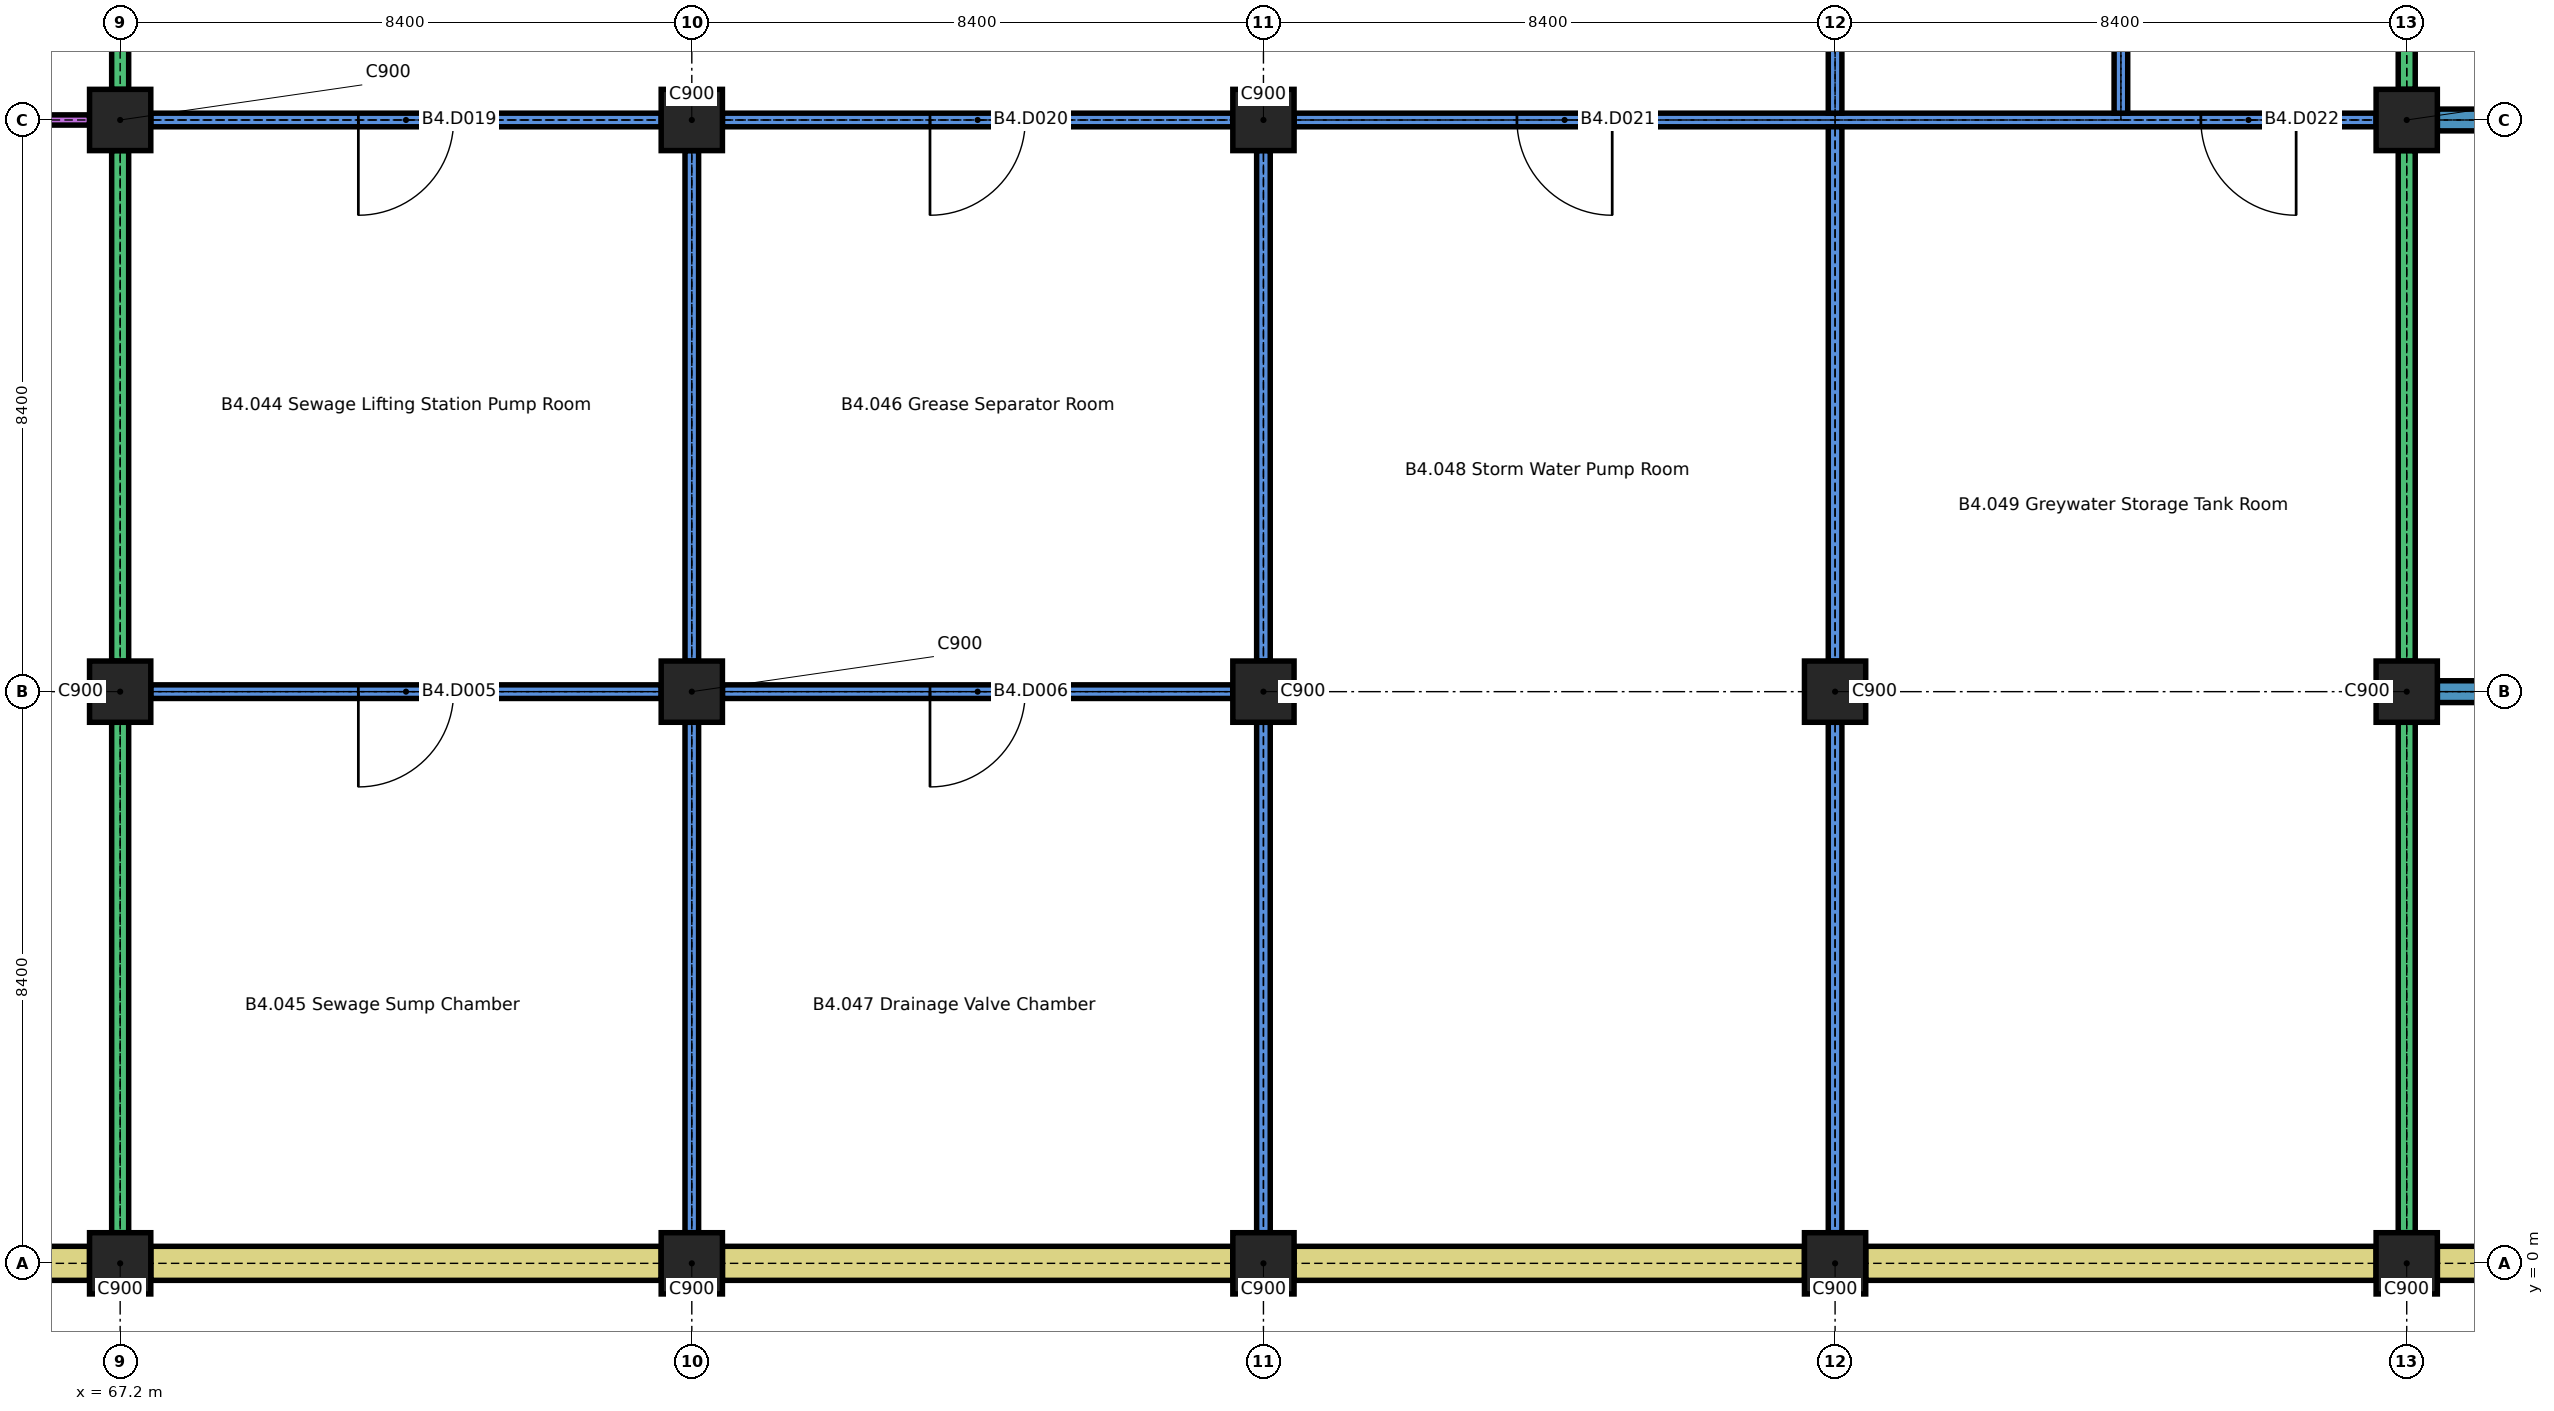
"""IFC4 building model, lengths in metres.
Left out: names, types, materials, properties, quantities, classifications, styles, units other than length and angle.
Written with IfcOpenShell. Run it as: python <this file> out.ifc"""

import sys

from ifc_helpers import new_model, si_unit, direction, frame, frame_2d, origin, origin_2d, place, context, subcontext, project, spatial, rectangle, extrude, element, fill, save


model = new_model("IFC4")
c1 = context("Model", 3, precision=1e-05, world=origin(), true_north=direction((0.0, 1.0)))
c2 = subcontext(c1, "Body", "Model", "MODEL_VIEW")
j1 = project(units=[si_unit("LENGTHUNIT", "METRE"), si_unit("PLANEANGLEUNIT", "RADIAN")], contexts=[c1])
p1 = place(None, origin())
s1 = spatial("IfcSite", under=j1, at=p1, CompositionType="ELEMENT")
p2 = place(p1, origin())
s2 = spatial("IfcBuilding", under=s1, at=p2, CompositionType="ELEMENT")
p3 = place(p2, frame((0.0, 0.0, -15.0)))
s3 = spatial("IfcBuildingStorey", under=s2, at=p3, CompositionType="ELEMENT", Elevation=-15.0)
for number, where, z_axis, x_axis in (
    (1, (67.2, 0.0, 0.0), (0.0, 0.0, 1.0), (1.0, 0.0, 0.0)),
    (2, (75.6, 0.0, 0.0), (0.0, 0.0, 1.0), (1.0, 0.0, 0.0)),
    (3, (84.0, 0.0, 0.0), (0.0, 0.0, 1.0), (1.0, 0.0, 0.0)),
    (4, (92.4, 0.0, 0.0), (0.0, 0.0, 1.0), (1.0, 0.0, 0.0)),
    (5, (100.8, 0.0, 0.0), (0.0, 0.0, 1.0), (1.0, 0.0, 0.0)),
    (6, (67.2, 8.4, 0.0), (0.0, 0.0, 1.0), (1.0, 0.0, 0.0)),
    (7, (75.6, 8.4, 0.0), (0.0, 0.0, 1.0), (1.0, 0.0, 0.0)),
    (8, (84.0, 8.4, 0.0), (0.0, 0.0, 1.0), (1.0, 0.0, 0.0)),
    (9, (92.4, 8.4, 0.0), (0.0, 0.0, 1.0), (1.0, 0.0, 0.0)),
    (10, (100.8, 8.4, 0.0), (0.0, 0.0, 1.0), (1.0, 0.0, 0.0)),
    (11, (67.2, 16.8, 0.0), (0.0, 0.0, 1.0), (1.0, 0.0, 0.0)),
    (12, (75.6, 16.8, 0.0), (0.0, 0.0, 1.0), (1.0, 0.0, 0.0)),
    (13, (84.0, 16.8, 0.0), (0.0, 0.0, 1.0), (1.0, 0.0, 0.0)),
    (14, (100.8, 16.8, 0.0), (0.0, 0.0, 1.0), (1.0, 0.0, 0.0)),
):
    element("IfcColumn", number, at=place(p3, frame(where, z_axis=z_axis, x_axis=x_axis)), inside=s3, PredefinedType="COLUMN", context=c2, shape_type="SweptSolid", body=[
        extrude(rectangle(XDim=0.9, YDim=0.9, at=origin_2d()), origin(), (0.0, 0.0, 1.0), 3.2),
    ])
for number, where, z_axis, x_axis in (
    (15, (59.25, 0.0, 0.0), (0.0, 0.0, 1.0), (1.0, 0.0, 0.0)),
    (16, (67.65, 0.0, 0.0), (0.0, 0.0, 1.0), (1.0, 0.0, 0.0)),
    (17, (76.05, 0.0, 0.0), (0.0, 0.0, 1.0), (1.0, 0.0, 0.0)),
    (18, (84.45, 0.0, 0.0), (0.0, 0.0, 1.0), (1.0, 0.0, 0.0)),
    (19, (92.85, 0.0, 0.0), (0.0, 0.0, 1.0), (1.0, 0.0, 0.0)),
    (20, (101.25, 0.0, 0.0), (0.0, 0.0, 1.0), (1.0, 0.0, 0.0)),
):
    element("IfcWall", number, at=place(p3, frame(where, z_axis=z_axis, x_axis=x_axis)), inside=s3, PredefinedType="SOLIDWALL", context=c2, shape_type="SweptSolid", body=[
        extrude(rectangle(XDim=7.5, YDim=0.5, at=frame_2d((3.75, 0.0))), origin(), (0.0, 0.0, 1.0), 3.2),
    ])
p4 = place(p3, frame((67.65, 8.4, 0.0), z_axis=(0.0, 0.0, 1.0), x_axis=(1.0, 0.0, 0.0)))
e21 = element("IfcWall", 21, at=p4, inside=s3, PredefinedType="PARTITIONING", context=c2, shape_type="SweptSolid", body=[
    extrude(rectangle(XDim=7.5, YDim=0.2, at=frame_2d((3.75, 0.0))), origin(), (0.0, 0.0, 1.0), 3.2),
])
p5 = place(p4, frame((3.05, 0.0, 0.0)))
e22 = element("IfcOpeningElement", 22, at=p5, cuts=e21, PredefinedType="OPENING", context=c2, shape_type="SweptSolid", body=[
    extrude(rectangle(XDim=1.4, YDim=2.1, at=frame_2d((0.7, 1.05))), frame((0.0, 0.11, 0.0), z_axis=(0.0, -1.0, 0.0), x_axis=(1.0, 0.0, 0.0)), (0.0, 0.0, 1.0), 0.22),
])
p6 = place(p3, frame((76.05, 8.4, 0.0), z_axis=(0.0, 0.0, 1.0), x_axis=(1.0, 0.0, 0.0)))
e23 = element("IfcWall", 23, at=p6, inside=s3, PredefinedType="PARTITIONING", context=c2, shape_type="SweptSolid", body=[
    extrude(rectangle(XDim=7.5, YDim=0.2, at=frame_2d((3.75, 0.0))), origin(), (0.0, 0.0, 1.0), 3.2),
])
p7 = place(p6, frame((3.05, 0.0, 0.0)))
e24 = element("IfcOpeningElement", 24, at=p7, cuts=e23, PredefinedType="OPENING", context=c2, shape_type="SweptSolid", body=[
    extrude(rectangle(XDim=1.4, YDim=2.1, at=frame_2d((0.7, 1.05))), frame((0.0, 0.11, 0.0), z_axis=(0.0, -1.0, 0.0), x_axis=(1.0, 0.0, 0.0)), (0.0, 0.0, 1.0), 0.22),
])
p8 = place(p3, frame((101.25, 8.4, 0.0), z_axis=(0.0, 0.0, 1.0), x_axis=(1.0, 0.0, 0.0)))
e25 = element("IfcWall", 25, at=p8, inside=s3, PredefinedType="SOLIDWALL", context=c2, shape_type="SweptSolid", body=[
    extrude(rectangle(XDim=7.5, YDim=0.32, at=frame_2d((3.75, 0.0))), origin(), (0.0, 0.0, 1.0), 3.2),
])
p9 = place(p8, frame((3.05, 0.0, 0.0)))
e26 = element("IfcOpeningElement", 26, at=p9, cuts=e25, PredefinedType="OPENING", context=c2, shape_type="SweptSolid", body=[
    extrude(rectangle(XDim=1.4, YDim=2.1, at=frame_2d((0.7, 1.05))), frame((0.0, 0.17, 0.0), z_axis=(0.0, -1.0, 0.0), x_axis=(1.0, 0.0, 0.0)), (0.0, 0.0, 1.0), 0.34),
])
p10 = place(p3, frame((59.25, 16.8, 0.0), z_axis=(0.0, 0.0, 1.0), x_axis=(1.0, 0.0, 0.0)))
e27 = element("IfcWall", 27, at=p10, inside=s3, PredefinedType="PARTITIONING", context=c2, shape_type="SweptSolid", body=[
    extrude(rectangle(XDim=7.5, YDim=0.15, at=frame_2d((3.75, 0.0))), origin(), (0.0, 0.0, 1.0), 3.2),
])
p11 = place(p10, frame((3.05, 0.0, 0.0)))
e28 = element("IfcOpeningElement", 28, at=p11, cuts=e27, PredefinedType="OPENING", context=c2, shape_type="SweptSolid", body=[
    extrude(rectangle(XDim=1.4, YDim=2.1, at=frame_2d((0.7, 1.05))), frame((0.0, 0.085, 0.0), z_axis=(0.0, -1.0, 0.0), x_axis=(1.0, 0.0, 0.0)), (0.0, 0.0, 1.0), 0.17),
])
p12 = place(p3, frame((67.65, 16.8, 0.0), z_axis=(0.0, 0.0, 1.0), x_axis=(1.0, 0.0, 0.0)))
e29 = element("IfcWall", 29, at=p12, inside=s3, PredefinedType="PARTITIONING", context=c2, shape_type="SweptSolid", body=[
    extrude(rectangle(XDim=7.5, YDim=0.2, at=frame_2d((3.75, 0.0))), origin(), (0.0, 0.0, 1.0), 3.2),
])
p13 = place(p12, frame((3.05, 0.0, 0.0)))
e30 = element("IfcOpeningElement", 30, at=p13, cuts=e29, PredefinedType="OPENING", context=c2, shape_type="SweptSolid", body=[
    extrude(rectangle(XDim=1.4, YDim=2.1, at=frame_2d((0.7, 1.05))), frame((0.0, 0.11, 0.0), z_axis=(0.0, -1.0, 0.0), x_axis=(1.0, 0.0, 0.0)), (0.0, 0.0, 1.0), 0.22),
])
p14 = place(p3, frame((76.05, 16.8, 0.0), z_axis=(0.0, 0.0, 1.0), x_axis=(1.0, 0.0, 0.0)))
e31 = element("IfcWall", 31, at=p14, inside=s3, PredefinedType="PARTITIONING", context=c2, shape_type="SweptSolid", body=[
    extrude(rectangle(XDim=7.5, YDim=0.2, at=frame_2d((3.75, 0.0))), origin(), (0.0, 0.0, 1.0), 3.2),
])
p15 = place(p14, frame((3.05, 0.0, 0.0)))
e32 = element("IfcOpeningElement", 32, at=p15, cuts=e31, PredefinedType="OPENING", context=c2, shape_type="SweptSolid", body=[
    extrude(rectangle(XDim=1.4, YDim=2.1, at=frame_2d((0.7, 1.05))), frame((0.0, 0.11, 0.0), z_axis=(0.0, -1.0, 0.0), x_axis=(1.0, 0.0, 0.0)), (0.0, 0.0, 1.0), 0.22),
])
p16 = place(p3, frame((84.45, 16.8, 0.0), z_axis=(0.0, 0.0, 1.0), x_axis=(1.0, 0.0, 0.0)))
e33 = element("IfcWall", 33, at=p16, inside=s3, PredefinedType="PARTITIONING", context=c2, shape_type="SweptSolid", body=[
    extrude(rectangle(XDim=15.9, YDim=0.2, at=frame_2d((7.95, 0.0))), origin(), (0.0, 0.0, 1.0), 3.2),
])
p17 = place(p16, frame((3.275, 0.0, 0.0)))
e34 = element("IfcOpeningElement", 34, at=p17, cuts=e33, PredefinedType="OPENING", context=c2, shape_type="SweptSolid", body=[
    extrude(rectangle(XDim=1.4, YDim=2.1, at=frame_2d((0.7, 1.05))), frame((0.0, 0.11, 0.0), z_axis=(0.0, -1.0, 0.0), x_axis=(1.0, 0.0, 0.0)), (0.0, 0.0, 1.0), 0.22),
])
p18 = place(p16, frame((13.325, 0.0, 0.0)))
e35 = element("IfcOpeningElement", 35, at=p18, cuts=e33, PredefinedType="OPENING", context=c2, shape_type="SweptSolid", body=[
    extrude(rectangle(XDim=1.4, YDim=2.1, at=frame_2d((0.7, 1.05))), frame((0.0, 0.11, 0.0), z_axis=(0.0, -1.0, 0.0), x_axis=(1.0, 0.0, 0.0)), (0.0, 0.0, 1.0), 0.22),
])
p19 = place(p3, frame((101.25, 16.8, 0.0), z_axis=(0.0, 0.0, 1.0), x_axis=(1.0, 0.0, 0.0)))
e36 = element("IfcWall", 36, at=p19, inside=s3, PredefinedType="SOLIDWALL", context=c2, shape_type="SweptSolid", body=[
    extrude(rectangle(XDim=7.5, YDim=0.32, at=frame_2d((3.75, 0.0))), origin(), (0.0, 0.0, 1.0), 3.2),
])
p20 = place(p19, frame((3.05, 0.0, 0.0)))
e37 = element("IfcOpeningElement", 37, at=p20, cuts=e36, PredefinedType="OPENING", context=c2, shape_type="SweptSolid", body=[
    extrude(rectangle(XDim=1.4, YDim=2.1, at=frame_2d((0.7, 1.05))), frame((0.0, 0.17, 0.0), z_axis=(0.0, -1.0, 0.0), x_axis=(1.0, 0.0, 0.0)), (0.0, 0.0, 1.0), 0.34),
])
for number, where, z_axis, x_axis in (
    (38, (67.2, 0.45, 0.0), (0.0, 0.0, 1.0), (0.0, 1.0, 0.0)),
    (39, (67.2, 8.85, 0.0), (0.0, 0.0, 1.0), (0.0, 1.0, 0.0)),
):
    element("IfcWall", number, at=place(p3, frame(where, z_axis=z_axis, x_axis=x_axis)), inside=s3, PredefinedType="SOLIDWALL", context=c2, shape_type="SweptSolid", body=[
        extrude(rectangle(XDim=7.5, YDim=0.25, at=frame_2d((3.75, 0.0))), origin(), (0.0, 0.0, 1.0), 3.2),
    ])
p21 = place(p3, frame((67.2, 17.25, 0.0), z_axis=(0.0, 0.0, 1.0), x_axis=(0.0, 1.0, 0.0)))
e40 = element("IfcWall", 40, at=p21, inside=s3, PredefinedType="SOLIDWALL", context=c2, shape_type="SweptSolid", body=[
    extrude(rectangle(XDim=12.75, YDim=0.25, at=frame_2d((6.375, 0.0))), origin(), (0.0, 0.0, 1.0), 3.2),
])
p22 = place(p21, frame((1.475, 0.0, 0.0)))
e41 = element("IfcOpeningElement", 41, at=p22, cuts=e40, PredefinedType="OPENING", context=c2, shape_type="SweptSolid", body=[
    extrude(rectangle(XDim=1.4, YDim=2.1, at=frame_2d((0.7, 1.05))), frame((0.0, 0.135, 0.0), z_axis=(0.0, -1.0, 0.0), x_axis=(1.0, 0.0, 0.0)), (0.0, 0.0, 1.0), 0.27),
])
for number, where, z_axis, x_axis in (
    (42, (75.6, 0.45, 0.0), (0.0, 0.0, 1.0), (0.0, 1.0, 0.0)),
    (43, (75.6, 8.85, 0.0), (0.0, 0.0, 1.0), (0.0, 1.0, 0.0)),
    (44, (84.0, 0.45, 0.0), (0.0, 0.0, 1.0), (0.0, 1.0, 0.0)),
    (45, (84.0, 8.85, 0.0), (0.0, 0.0, 1.0), (0.0, 1.0, 0.0)),
    (46, (92.4, 0.45, 0.0), (0.0, 0.0, 1.0), (0.0, 1.0, 0.0)),
):
    element("IfcWall", number, at=place(p3, frame(where, z_axis=z_axis, x_axis=x_axis)), inside=s3, PredefinedType="PARTITIONING", context=c2, shape_type="SweptSolid", body=[
        extrude(rectangle(XDim=7.5, YDim=0.2, at=frame_2d((3.75, 0.0))), origin(), (0.0, 0.0, 1.0), 3.2),
    ])
p23 = place(p3, frame((92.4, 8.85, 0.0), z_axis=(0.0, 0.0, 1.0), x_axis=(0.0, 1.0, 0.0)))
e47 = element("IfcWall", 47, at=p23, inside=s3, PredefinedType="PARTITIONING", context=c2, shape_type="SweptSolid", body=[
    extrude(rectangle(XDim=7.85, YDim=0.2, at=frame_2d((3.925, 0.0))), origin(), (0.0, 0.0, 1.0), 3.2),
])
p24 = place(p3, frame((92.4, 16.9, 0.0), z_axis=(0.0, 0.0, 1.0), x_axis=(0.0, 1.0, 0.0)))
e48 = element("IfcWall", 48, at=p24, inside=s3, PredefinedType="PARTITIONING", context=c2, shape_type="SweptSolid", body=[
    extrude(rectangle(XDim=4.5, YDim=0.2, at=frame_2d((2.25, 0.0))), origin(), (0.0, 0.0, 1.0), 3.2),
])
p25 = place(p24, frame((1.25, 0.0, 0.0)))
e49 = element("IfcOpeningElement", 49, at=p25, cuts=e48, PredefinedType="OPENING", context=c2, shape_type="SweptSolid", body=[
    extrude(rectangle(XDim=2.0, YDim=2.4, at=frame_2d((1.0, 1.2))), frame((0.0, 0.11, 0.0), z_axis=(0.0, -1.0, 0.0), x_axis=(1.0, 0.0, 0.0)), (0.0, 0.0, 1.0), 0.22),
])
p26 = place(p3, frame((96.6, 16.9, 0.0), z_axis=(0.0, 0.0, 1.0), x_axis=(0.0, 1.0, 0.0)))
e50 = element("IfcWall", 50, at=p26, inside=s3, PredefinedType="PARTITIONING", context=c2, shape_type="SweptSolid", body=[
    extrude(rectangle(XDim=4.5, YDim=0.2, at=frame_2d((2.25, 0.0))), origin(), (0.0, 0.0, 1.0), 3.2),
])
p27 = place(p26, frame((1.25, 0.0, 0.0)))
e51 = element("IfcOpeningElement", 51, at=p27, cuts=e50, PredefinedType="OPENING", context=c2, shape_type="SweptSolid", body=[
    extrude(rectangle(XDim=2.0, YDim=2.4, at=frame_2d((1.0, 1.2))), frame((0.0, 0.11, 0.0), z_axis=(0.0, -1.0, 0.0), x_axis=(1.0, 0.0, 0.0)), (0.0, 0.0, 1.0), 0.22),
])
for number, where, z_axis, x_axis in (
    (52, (100.8, 0.45, 0.0), (0.0, 0.0, 1.0), (0.0, 1.0, 0.0)),
    (53, (100.8, 8.85, 0.0), (0.0, 0.0, 1.0), (0.0, 1.0, 0.0)),
):
    element("IfcWall", number, at=place(p3, frame(where, z_axis=z_axis, x_axis=x_axis)), inside=s3, PredefinedType="SOLIDWALL", context=c2, shape_type="SweptSolid", body=[
        extrude(rectangle(XDim=7.5, YDim=0.25, at=frame_2d((3.75, 0.0))), origin(), (0.0, 0.0, 1.0), 3.2),
    ])
p28 = place(p3, frame((100.8, 17.25, 0.0), z_axis=(0.0, 0.0, 1.0), x_axis=(0.0, 1.0, 0.0)))
e54 = element("IfcWall", 54, at=p28, inside=s3, PredefinedType="SOLIDWALL", context=c2, shape_type="SweptSolid", body=[
    extrude(rectangle(XDim=4.19, YDim=0.25, at=frame_2d((2.095, 0.0))), origin(), (0.0, 0.0, 1.0), 3.2),
])
p29 = place(p28, frame((1.395, 0.0, 0.0)))
e55 = element("IfcOpeningElement", 55, at=p29, cuts=e54, PredefinedType="OPENING", context=c2, shape_type="SweptSolid", body=[
    extrude(rectangle(XDim=1.4, YDim=2.1, at=frame_2d((0.7, 1.05))), frame((0.0, 0.135, 0.0), z_axis=(0.0, -1.0, 0.0), x_axis=(1.0, 0.0, 0.0)), (0.0, 0.0, 1.0), 0.27),
])
p30 = place(p5, origin())
e56 = element("IfcDoor", 56, at=p30, inside=s3, OperationType="SINGLE_SWING_LEFT", PredefinedType="DOOR", context=c2, shape_type="SweptSolid", body=[
    extrude(rectangle(XDim=1.4, YDim=2.1, at=frame_2d((0.7, 1.05))), frame((0.0, 0.025, 0.0), z_axis=(0.0, -1.0, 0.0), x_axis=(1.0, 0.0, 0.0)), (0.0, 0.0, 1.0), 0.05),
])
fill(e22, e56)
p31 = place(p7, origin())
e57 = element("IfcDoor", 57, at=p31, inside=s3, OperationType="SINGLE_SWING_LEFT", PredefinedType="DOOR", context=c2, shape_type="SweptSolid", body=[
    extrude(rectangle(XDim=1.4, YDim=2.1, at=frame_2d((0.7, 1.05))), frame((0.0, 0.025, 0.0), z_axis=(0.0, -1.0, 0.0), x_axis=(1.0, 0.0, 0.0)), (0.0, 0.0, 1.0), 0.05),
])
fill(e24, e57)
p32 = place(p13, origin())
e58 = element("IfcDoor", 58, at=p32, inside=s3, OperationType="SINGLE_SWING_LEFT", PredefinedType="DOOR", context=c2, shape_type="SweptSolid", body=[
    extrude(rectangle(XDim=1.4, YDim=2.1, at=frame_2d((0.7, 1.05))), frame((0.0, 0.025, 0.0), z_axis=(0.0, -1.0, 0.0), x_axis=(1.0, 0.0, 0.0)), (0.0, 0.0, 1.0), 0.05),
])
fill(e30, e58)
p33 = place(p15, origin())
e59 = element("IfcDoor", 59, at=p33, inside=s3, OperationType="SINGLE_SWING_LEFT", PredefinedType="DOOR", context=c2, shape_type="SweptSolid", body=[
    extrude(rectangle(XDim=1.4, YDim=2.1, at=frame_2d((0.7, 1.05))), frame((0.0, 0.025, 0.0), z_axis=(0.0, -1.0, 0.0), x_axis=(1.0, 0.0, 0.0)), (0.0, 0.0, 1.0), 0.05),
])
fill(e32, e59)
p34 = place(p17, origin())
e60 = element("IfcDoor", 60, at=p34, inside=s3, OperationType="SINGLE_SWING_RIGHT", PredefinedType="DOOR", context=c2, shape_type="SweptSolid", body=[
    extrude(rectangle(XDim=1.4, YDim=2.1, at=frame_2d((0.7, 1.05))), frame((0.0, 0.025, 0.0), z_axis=(0.0, -1.0, 0.0), x_axis=(1.0, 0.0, 0.0)), (0.0, 0.0, 1.0), 0.05),
])
fill(e34, e60)
p35 = place(p18, origin())
e61 = element("IfcDoor", 61, at=p35, inside=s3, OperationType="SINGLE_SWING_RIGHT", PredefinedType="DOOR", context=c2, shape_type="SweptSolid", body=[
    extrude(rectangle(XDim=1.4, YDim=2.1, at=frame_2d((0.7, 1.05))), frame((0.0, 0.025, 0.0), z_axis=(0.0, -1.0, 0.0), x_axis=(1.0, 0.0, 0.0)), (0.0, 0.0, 1.0), 0.05),
])
fill(e35, e61)
save(model, sys.argv[1])
